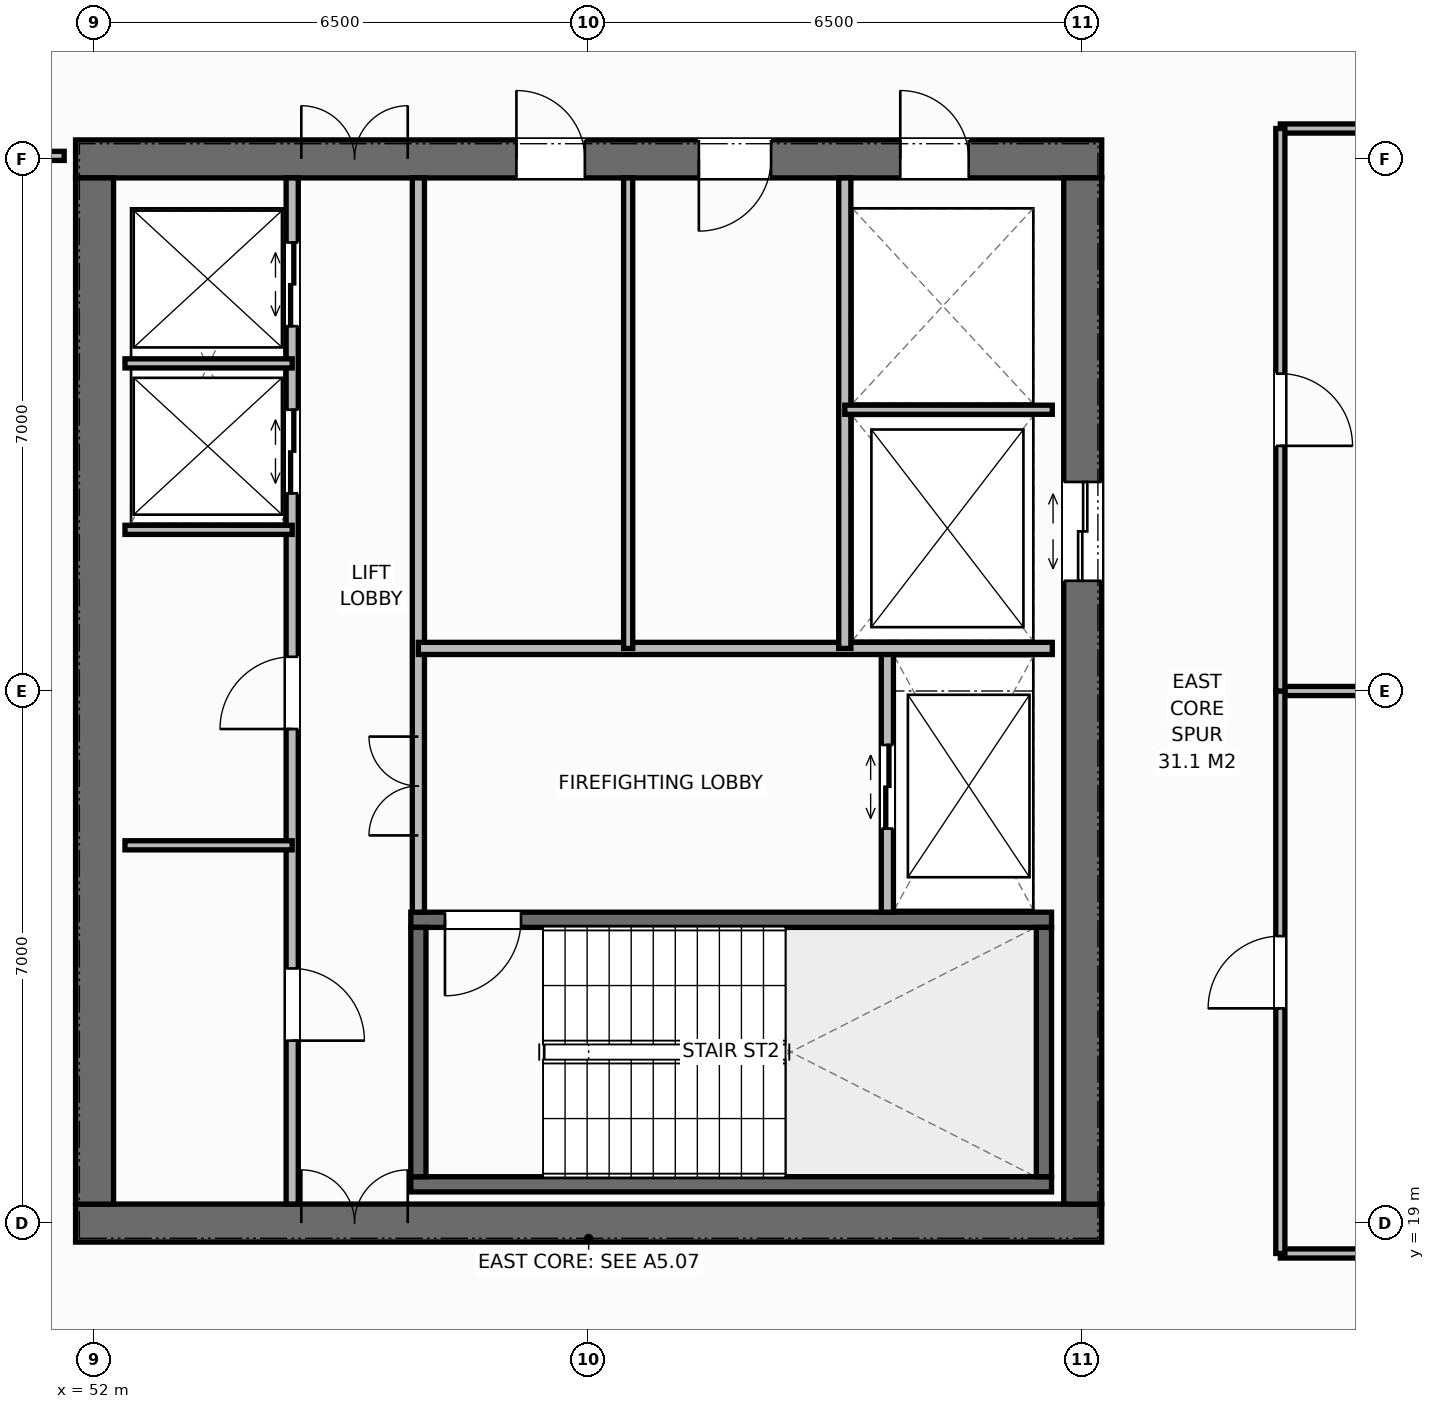
"""IFC4 building model, lengths in metres.
Left out: names, types, materials, properties, quantities, classifications, styles, units other than length and angle.
Written with IfcOpenShell. Run it as: python <this file> out.ifc"""

import sys

from ifc_helpers import new_model, si_unit, direction, frame, frame_2d, origin, place, context, subcontext, project, spatial, rectangle, extrude, element, fill, save


model = new_model("IFC4")
c1 = context("Model", 3, precision=1e-05, world=origin(), true_north=direction((0.0, 1.0)))
c2 = subcontext(c1, "Body", "Model", "MODEL_VIEW")
j1 = project(units=[si_unit("LENGTHUNIT", "METRE"), si_unit("PLANEANGLEUNIT", "RADIAN")], contexts=[c1])
p1 = place(None, origin())
s1 = spatial("IfcSite", under=j1, at=p1, CompositionType="ELEMENT")
p2 = place(p1, origin())
s2 = spatial("IfcBuilding", under=s1, at=p2, CompositionType="ELEMENT")
p3 = place(p2, frame((0.0, 0.0, 302.4)))
s3 = spatial("IfcBuildingStorey", under=s2, at=p3, CompositionType="ELEMENT", Elevation=302.4)
p4 = place(p3, frame((51.75, 19.0, 0.0), z_axis=(0.0, 0.0, 1.0), x_axis=(1.0, 0.0, 0.0)))
e1 = element("IfcWall", 1, at=p4, inside=s3, PredefinedType="SHEAR", context=c2, shape_type="SweptSolid", body=[
    extrude(rectangle(XDim=13.5, YDim=0.5, at=frame_2d((6.75, 0.0))), origin(), (0.0, 0.0, 1.0), 4.0),
])
p5 = place(p4, frame((2.97, 0.0, 0.0)))
e2 = element("IfcOpeningElement", 2, at=p5, cuts=e1, PredefinedType="OPENING", context=c2, shape_type="SweptSolid", body=[
    extrude(rectangle(XDim=1.4, YDim=2.2, at=frame_2d((0.7, 1.1))), frame((0.0, 0.26, 0.0), z_axis=(0.0, -1.0, 0.0), x_axis=(1.0, 0.0, 0.0)), (0.0, 0.0, 1.0), 0.52),
])
p6 = place(p3, frame((51.75, 33.0, 0.0), z_axis=(0.0, 0.0, 1.0), x_axis=(1.0, 0.0, 0.0)))
e3 = element("IfcWall", 3, at=p6, inside=s3, PredefinedType="SHEAR", context=c2, shape_type="SweptSolid", body=[
    extrude(rectangle(XDim=13.5, YDim=0.5, at=frame_2d((6.75, 0.0))), origin(), (0.0, 0.0, 1.0), 4.0),
])
p7 = place(p6, frame((2.97, 0.0, 0.0)))
e4 = element("IfcOpeningElement", 4, at=p7, cuts=e3, PredefinedType="OPENING", context=c2, shape_type="SweptSolid", body=[
    extrude(rectangle(XDim=1.4, YDim=2.2, at=frame_2d((0.7, 1.1))), frame((0.0, 0.26, 0.0), z_axis=(0.0, -1.0, 0.0), x_axis=(1.0, 0.0, 0.0)), (0.0, 0.0, 1.0), 0.52),
])
p8 = place(p6, frame((10.85, 0.0, 0.0)))
e5 = element("IfcOpeningElement", 5, at=p8, cuts=e3, PredefinedType="OPENING", context=c2, shape_type="SweptSolid", body=[
    extrude(rectangle(XDim=0.9, YDim=2.15, at=frame_2d((0.45, 1.075))), frame((0.0, 0.26, 0.0), z_axis=(0.0, -1.0, 0.0), x_axis=(1.0, 0.0, 0.0)), (0.0, 0.0, 1.0), 0.52),
])
p9 = place(p6, frame((5.8, 0.0, 0.0)))
e6 = element("IfcOpeningElement", 6, at=p9, cuts=e3, PredefinedType="OPENING", context=c2, shape_type="SweptSolid", body=[
    extrude(rectangle(XDim=0.9, YDim=2.15, at=frame_2d((0.45, 1.075))), frame((0.0, 0.26, 0.0), z_axis=(0.0, -1.0, 0.0), x_axis=(1.0, 0.0, 0.0)), (0.0, 0.0, 1.0), 0.52),
])
p10 = place(p6, frame((8.2, 0.0, 0.0)))
e7 = element("IfcOpeningElement", 7, at=p10, cuts=e3, PredefinedType="OPENING", context=c2, shape_type="SweptSolid", body=[
    extrude(rectangle(XDim=0.95, YDim=2.15, at=frame_2d((0.475, 1.075))), frame((0.0, 0.26, 0.0), z_axis=(0.0, -1.0, 0.0), x_axis=(1.0, 0.0, 0.0)), (0.0, 0.0, 1.0), 0.52),
])
p11 = place(p3, frame((52.0, 19.25, 0.0), z_axis=(0.0, 0.0, 1.0), x_axis=(0.0, 1.0, 0.0)))
e8 = element("IfcWall", 8, at=p11, inside=s3, PredefinedType="SHEAR", context=c2, shape_type="SweptSolid", body=[
    extrude(rectangle(XDim=13.5, YDim=0.5, at=frame_2d((6.75, 0.0))), origin(), (0.0, 0.0, 1.0), 4.0),
])
p12 = place(p3, frame((65.0, 19.25, 0.0), z_axis=(0.0, 0.0, 1.0), x_axis=(0.0, 1.0, 0.0)))
e9 = element("IfcWall", 9, at=p12, inside=s3, PredefinedType="SHEAR", context=c2, shape_type="SweptSolid", body=[
    extrude(rectangle(XDim=13.5, YDim=0.5, at=frame_2d((6.75, 0.0))), origin(), (0.0, 0.0, 1.0), 4.0),
])
p13 = place(p12, frame((8.2, 0.0, 0.0)))
e10 = element("IfcOpeningElement", 10, at=p13, cuts=e9, PredefinedType="OPENING", context=c2, shape_type="SweptSolid", body=[
    extrude(rectangle(XDim=1.3, YDim=2.2, at=frame_2d((0.65, 1.1))), frame((0.0, 0.26, 0.0), z_axis=(0.0, -1.0, 0.0), x_axis=(1.0, 0.0, 0.0)), (0.0, 0.0, 1.0), 0.52),
])
p14 = place(p3, frame((56.16, 19.51, 0.0), z_axis=(0.0, 0.0, 1.0), x_axis=(1.0, 0.0, 0.0)))
e11 = element("IfcWall", 11, at=p14, inside=s3, PredefinedType="SHEAR", context=c2, shape_type="SweptSolid", body=[
    extrude(rectangle(XDim=8.43, YDim=0.2, at=frame_2d((4.215, 0.0))), origin(), (0.0, 0.0, 1.0), 4.0),
])
p15 = place(p3, frame((56.16, 22.99, 0.0), z_axis=(0.0, 0.0, 1.0), x_axis=(1.0, 0.0, 0.0)))
e12 = element("IfcWall", 12, at=p15, inside=s3, PredefinedType="SHEAR", context=c2, shape_type="SweptSolid", body=[
    extrude(rectangle(XDim=8.43, YDim=0.2, at=frame_2d((4.215, 0.0))), origin(), (0.0, 0.0, 1.0), 4.0),
])
p16 = place(p15, frame((0.45, 0.0, 0.0)))
e13 = element("IfcOpeningElement", 13, at=p16, cuts=e12, PredefinedType="OPENING", context=c2, shape_type="SweptSolid", body=[
    extrude(rectangle(XDim=1.0, YDim=2.15, at=frame_2d((0.5, 1.075))), frame((0.0, 0.11, 0.0), z_axis=(0.0, -1.0, 0.0), x_axis=(1.0, 0.0, 0.0)), (0.0, 0.0, 1.0), 0.22),
])
for number, where, z_axis, x_axis in (
    (14, (56.26, 19.61, 0.0), (0.0, 0.0, 1.0), (0.0, 1.0, 0.0)),
    (15, (64.49, 19.61, 0.0), (0.0, 0.0, 1.0), (0.0, 1.0, 0.0)),
):
    element("IfcWall", number, at=place(p3, frame(where, z_axis=z_axis, x_axis=x_axis)), inside=s3, PredefinedType="SHEAR", context=c2, shape_type="SweptSolid", body=[
        extrude(rectangle(XDim=3.28, YDim=0.2, at=frame_2d((1.64, 0.0))), origin(), (0.0, 0.0, 1.0), 4.0),
    ])
p17 = place(p3, frame((54.6, 19.25, 0.0), z_axis=(0.0, 0.0, 1.0), x_axis=(0.0, 1.0, 0.0)))
e16 = element("IfcWall", 16, at=p17, inside=s3, PredefinedType="STANDARD", context=c2, shape_type="SweptSolid", body=[
    extrude(rectangle(XDim=13.5, YDim=0.16, at=frame_2d((6.75, 0.0))), origin(), (0.0, 0.0, 1.0), 3.788),
])
p18 = place(p17, frame((2.15, 0.0, 0.0)))
e17 = element("IfcOpeningElement", 17, at=p18, cuts=e16, PredefinedType="OPENING", context=c2, shape_type="SweptSolid", body=[
    extrude(rectangle(XDim=0.95, YDim=2.15, at=frame_2d((0.475, 1.075))), frame((0.0, 0.09, 0.0), z_axis=(0.0, -1.0, 0.0), x_axis=(1.0, 0.0, 0.0)), (0.0, 0.0, 1.0), 0.18),
])
p19 = place(p17, frame((6.25, 0.0, 0.0)))
e18 = element("IfcOpeningElement", 18, at=p19, cuts=e16, PredefinedType="OPENING", context=c2, shape_type="SweptSolid", body=[
    extrude(rectangle(XDim=0.95, YDim=2.15, at=frame_2d((0.475, 1.075))), frame((0.0, 0.09, 0.0), z_axis=(0.0, -1.0, 0.0), x_axis=(1.0, 0.0, 0.0)), (0.0, 0.0, 1.0), 0.18),
])
p20 = place(p17, frame((9.35, 0.0, 0.0)))
e19 = element("IfcOpeningElement", 19, at=p20, cuts=e16, PredefinedType="OPENING", context=c2, shape_type="SweptSolid", body=[
    extrude(rectangle(XDim=1.1, YDim=2.2, at=frame_2d((0.55, 1.1))), frame((0.0, 0.09, 0.0), z_axis=(0.0, -1.0, 0.0), x_axis=(1.0, 0.0, 0.0)), (0.0, 0.0, 1.0), 0.18),
])
p21 = place(p17, frame((11.55, 0.0, 0.0)))
e20 = element("IfcOpeningElement", 20, at=p21, cuts=e16, PredefinedType="OPENING", context=c2, shape_type="SweptSolid", body=[
    extrude(rectangle(XDim=1.1, YDim=2.2, at=frame_2d((0.55, 1.1))), frame((0.0, 0.09, 0.0), z_axis=(0.0, -1.0, 0.0), x_axis=(1.0, 0.0, 0.0)), (0.0, 0.0, 1.0), 0.18),
])
p22 = place(p3, frame((56.26, 23.09, 0.0), z_axis=(0.0, 0.0, 1.0), x_axis=(0.0, 1.0, 0.0)))
e21 = element("IfcWall", 21, at=p22, inside=s3, PredefinedType="STANDARD", context=c2, shape_type="SweptSolid", body=[
    extrude(rectangle(XDim=9.66, YDim=0.16, at=frame_2d((4.83, 0.0))), origin(), (0.0, 0.0, 1.0), 3.788),
])
p23 = place(p22, frame((1.01, 0.0, 0.0)))
e22 = element("IfcOpeningElement", 22, at=p23, cuts=e21, PredefinedType="OPENING", context=c2, shape_type="SweptSolid", body=[
    extrude(rectangle(XDim=1.3, YDim=2.2, at=frame_2d((0.65, 1.1))), frame((0.0, 0.09, 0.0), z_axis=(0.0, -1.0, 0.0), x_axis=(1.0, 0.0, 0.0)), (0.0, 0.0, 1.0), 0.18),
])
for number, where, z_axis, x_axis in (
    (23, (52.4, 23.97, 0.0), (0.0, 0.0, 1.0), (1.0, 0.0, 0.0)),
    (24, (52.4, 28.12, 0.0), (0.0, 0.0, 1.0), (1.0, 0.0, 0.0)),
    (25, (52.4, 30.31, 0.0), (0.0, 0.0, 1.0), (1.0, 0.0, 0.0)),
):
    element("IfcWall", number, at=place(p3, frame(where, z_axis=z_axis, x_axis=x_axis)), inside=s3, PredefinedType="PARTITIONING", context=c2, shape_type="SweptSolid", body=[
        extrude(rectangle(XDim=2.2, YDim=0.12, at=frame_2d((1.1, 0.0))), origin(), (0.0, 0.0, 1.0), 3.788),
    ])
p24 = place(p3, frame((62.43, 23.09, 0.0), z_axis=(0.0, 0.0, 1.0), x_axis=(0.0, 1.0, 0.0)))
e26 = element("IfcWall", 26, at=p24, inside=s3, PredefinedType="STANDARD", context=c2, shape_type="SweptSolid", body=[
    extrude(rectangle(XDim=3.47, YDim=0.16, at=frame_2d((1.735, 0.0))), origin(), (0.0, 0.0, 1.0), 3.788),
])
p25 = place(p24, frame((1.1, 0.0, 0.0)))
e27 = element("IfcOpeningElement", 27, at=p25, cuts=e26, PredefinedType="OPENING", context=c2, shape_type="SweptSolid", body=[
    extrude(rectangle(XDim=1.1, YDim=2.2, at=frame_2d((0.55, 1.1))), frame((0.0, 0.09, 0.0), z_axis=(0.0, -1.0, 0.0), x_axis=(1.0, 0.0, 0.0)), (0.0, 0.0, 1.0), 0.18),
])
p26 = place(p3, frame((56.26, 26.56, 0.0), z_axis=(0.0, 0.0, 1.0), x_axis=(1.0, 0.0, 0.0)))
e28 = element("IfcWall", 28, at=p26, inside=s3, PredefinedType="STANDARD", context=c2, shape_type="SweptSolid", body=[
    extrude(rectangle(XDim=8.34, YDim=0.16, at=frame_2d((4.17, 0.0))), origin(), (0.0, 0.0, 1.0), 3.788),
])
p27 = place(p3, frame((61.87, 26.56, 0.0), z_axis=(0.0, 0.0, 1.0), x_axis=(0.0, 1.0, 0.0)))
e29 = element("IfcWall", 29, at=p27, inside=s3, PredefinedType="STANDARD", context=c2, shape_type="SweptSolid", body=[
    extrude(rectangle(XDim=6.19, YDim=0.16, at=frame_2d((3.095, 0.0))), origin(), (0.0, 0.0, 1.0), 3.788),
])
p28 = place(p3, frame((61.87, 29.7, 0.0), z_axis=(0.0, 0.0, 1.0), x_axis=(1.0, 0.0, 0.0)))
e30 = element("IfcWall", 30, at=p28, inside=s3, PredefinedType="PARTITIONING", context=c2, shape_type="SweptSolid", body=[
    extrude(rectangle(XDim=2.73, YDim=0.12, at=frame_2d((1.365, 0.0))), origin(), (0.0, 0.0, 1.0), 3.788),
])
p29 = place(p3, frame((59.02, 26.56, 0.0), z_axis=(0.0, 0.0, 1.0), x_axis=(0.0, 1.0, 0.0)))
e31 = element("IfcWall", 31, at=p29, inside=s3, PredefinedType="PARTITIONING", context=c2, shape_type="SweptSolid", body=[
    extrude(rectangle(XDim=6.19, YDim=0.12, at=frame_2d((3.095, 0.0))), origin(), (0.0, 0.0, 1.0), 3.788),
])
p30 = place(p3, frame((48.0, 33.04, 0.0), z_axis=(0.0, 0.0, 1.0), x_axis=(1.0, 0.0, 0.0)))
e32 = element("IfcWall", 32, at=p30, inside=s3, PredefinedType="PARTITIONING", context=c2, shape_type="SweptSolid", body=[
    extrude(rectangle(XDim=3.6, YDim=0.12, at=frame_2d((1.8, 0.0))), origin(), (0.0, 0.0, 1.0), 3.528),
])
p31 = place(p30, frame((1.1, 0.0, 0.0)))
e33 = element("IfcOpeningElement", 33, at=p31, cuts=e32, PredefinedType="OPENING", context=c2, shape_type="SweptSolid", body=[
    extrude(rectangle(XDim=0.95, YDim=2.15, at=frame_2d((0.475, 1.075))), frame((0.0, 0.07, 0.0), z_axis=(0.0, -1.0, 0.0), x_axis=(1.0, 0.0, 0.0)), (0.0, 0.0, 1.0), 0.14),
])
for number, where, z_axis, x_axis in (
    (34, (67.6, 18.6, 0.0), (0.0, 0.0, 1.0), (1.0, 0.0, 0.0)),
    (35, (67.6, 33.4, 0.0), (0.0, 0.0, 1.0), (1.0, 0.0, 0.0)),
    (36, (67.6, 26.0, 0.0), (0.0, 0.0, 1.0), (1.0, 0.0, 0.0)),
):
    element("IfcWall", number, at=place(p3, frame(where, z_axis=z_axis, x_axis=x_axis)), inside=s3, PredefinedType="PARTITIONING", context=c2, shape_type="SweptSolid", body=[
        extrude(rectangle(XDim=6.432, YDim=0.12, at=frame_2d((3.216, 0.0))), origin(), (0.0, 0.0, 1.0), 3.788),
    ])
p32 = place(p3, frame((67.6, 18.6, 0.0), z_axis=(0.0, 0.0, 1.0), x_axis=(0.0, 1.0, 0.0)))
e37 = element("IfcWall", 37, at=p32, inside=s3, PredefinedType="PARTITIONING", context=c2, shape_type="SweptSolid", body=[
    extrude(rectangle(XDim=7.4, YDim=0.12, at=frame_2d((3.7, 0.0))), origin(), (0.0, 0.0, 1.0), 3.788),
])
p33 = place(p32, frame((3.225, 0.0, 0.0)))
e38 = element("IfcOpeningElement", 38, at=p33, cuts=e37, PredefinedType="OPENING", context=c2, shape_type="SweptSolid", body=[
    extrude(rectangle(XDim=0.95, YDim=2.15, at=frame_2d((0.475, 1.075))), frame((0.0, 0.07, 0.0), z_axis=(0.0, -1.0, 0.0), x_axis=(1.0, 0.0, 0.0)), (0.0, 0.0, 1.0), 0.14),
])
p34 = place(p3, frame((67.6, 26.0, 0.0), z_axis=(0.0, 0.0, 1.0), x_axis=(0.0, 1.0, 0.0)))
e39 = element("IfcWall", 39, at=p34, inside=s3, PredefinedType="PARTITIONING", context=c2, shape_type="SweptSolid", body=[
    extrude(rectangle(XDim=7.4, YDim=0.12, at=frame_2d((3.7, 0.0))), origin(), (0.0, 0.0, 1.0), 3.788),
])
p35 = place(p34, frame((3.225, 0.0, 0.0)))
e40 = element("IfcOpeningElement", 40, at=p35, cuts=e39, PredefinedType="OPENING", context=c2, shape_type="SweptSolid", body=[
    extrude(rectangle(XDim=0.95, YDim=2.15, at=frame_2d((0.475, 1.075))), frame((0.0, 0.07, 0.0), z_axis=(0.0, -1.0, 0.0), x_axis=(1.0, 0.0, 0.0)), (0.0, 0.0, 1.0), 0.14),
])
p36 = place(p5, origin())
e41 = element("IfcDoor", 41, at=p36, inside=s3, OperationType="DOUBLE_DOOR_SINGLE_SWING", PredefinedType="DOOR", context=c2, shape_type="SweptSolid", body=[
    extrude(rectangle(XDim=1.4, YDim=2.2, at=frame_2d((0.7, 1.1))), frame((0.0, 0.075, 0.0), z_axis=(0.0, -1.0, 0.0), x_axis=(1.0, 0.0, 0.0)), (0.0, 0.0, 1.0), 0.05),
])
fill(e2, e41)
p37 = place(p7, origin())
e42 = element("IfcDoor", 42, at=p37, inside=s3, OperationType="DOUBLE_DOOR_SINGLE_SWING", PredefinedType="DOOR", context=c2, shape_type="SweptSolid", body=[
    extrude(rectangle(XDim=1.4, YDim=2.2, at=frame_2d((0.7, 1.1))), frame((0.0, -0.025, 0.0), z_axis=(0.0, -1.0, 0.0), x_axis=(1.0, 0.0, 0.0)), (0.0, 0.0, 1.0), 0.05),
])
fill(e4, e42)
p38 = place(p18, origin())
e43 = element("IfcDoor", 43, at=p38, inside=s3, OperationType="SINGLE_SWING_RIGHT", PredefinedType="DOOR", context=c2, shape_type="SweptSolid", body=[
    extrude(rectangle(XDim=0.95, YDim=2.15, at=frame_2d((0.475, 1.075))), frame((0.0, 0.025, 0.0), z_axis=(0.0, -1.0, 0.0), x_axis=(1.0, 0.0, 0.0)), (0.0, 0.0, 1.0), 0.05),
])
fill(e17, e43)
p39 = place(p19, origin())
e44 = element("IfcDoor", 44, at=p39, inside=s3, OperationType="SINGLE_SWING_LEFT", PredefinedType="DOOR", context=c2, shape_type="SweptSolid", body=[
    extrude(rectangle(XDim=0.95, YDim=2.15, at=frame_2d((0.475, 1.075))), frame((0.0, 0.025, 0.0), z_axis=(0.0, -1.0, 0.0), x_axis=(1.0, 0.0, 0.0)), (0.0, 0.0, 1.0), 0.05),
])
fill(e18, e44)
p40 = place(p20, origin())
e45 = element("IfcDoor", 45, at=p40, inside=s3, OperationType="DOUBLE_DOOR_SLIDING", PredefinedType="DOOR", context=c2, shape_type="SweptSolid", body=[
    extrude(rectangle(XDim=1.1, YDim=2.2, at=frame_2d((0.55, 1.1))), frame((0.0, 0.025, 0.0), z_axis=(0.0, -1.0, 0.0), x_axis=(1.0, 0.0, 0.0)), (0.0, 0.0, 1.0), 0.05),
])
fill(e19, e45)
p41 = place(p21, origin())
e46 = element("IfcDoor", 46, at=p41, inside=s3, OperationType="DOUBLE_DOOR_SLIDING", PredefinedType="DOOR", context=c2, shape_type="SweptSolid", body=[
    extrude(rectangle(XDim=1.1, YDim=2.2, at=frame_2d((0.55, 1.1))), frame((0.0, 0.025, 0.0), z_axis=(0.0, -1.0, 0.0), x_axis=(1.0, 0.0, 0.0)), (0.0, 0.0, 1.0), 0.05),
])
fill(e20, e46)
p42 = place(p16, origin())
e47 = element("IfcDoor", 47, at=p42, inside=s3, OperationType="SINGLE_SWING_RIGHT", PredefinedType="DOOR", context=c2, shape_type="SweptSolid", body=[
    extrude(rectangle(XDim=1.0, YDim=2.15, at=frame_2d((0.5, 1.075))), frame((0.0, 0.025, 0.0), z_axis=(0.0, -1.0, 0.0), x_axis=(1.0, 0.0, 0.0)), (0.0, 0.0, 1.0), 0.05),
])
fill(e13, e47)
p43 = place(p25, origin())
e48 = element("IfcDoor", 48, at=p43, inside=s3, OperationType="DOUBLE_DOOR_SLIDING", PredefinedType="DOOR", context=c2, shape_type="SweptSolid", body=[
    extrude(rectangle(XDim=1.1, YDim=2.2, at=frame_2d((0.55, 1.1))), frame((0.0, 0.025, 0.0), z_axis=(0.0, -1.0, 0.0), x_axis=(1.0, 0.0, 0.0)), (0.0, 0.0, 1.0), 0.05),
])
fill(e27, e48)
p44 = place(p23, origin())
e49 = element("IfcDoor", 49, at=p44, inside=s3, OperationType="DOUBLE_DOOR_SINGLE_SWING", PredefinedType="DOOR", context=c2, shape_type="SweptSolid", body=[
    extrude(rectangle(XDim=1.3, YDim=2.2, at=frame_2d((0.65, 1.1))), frame((0.0, 0.025, 0.0), z_axis=(0.0, -1.0, 0.0), x_axis=(1.0, 0.0, 0.0)), (0.0, 0.0, 1.0), 0.05),
])
fill(e22, e49)
p45 = place(p13, origin())
e50 = element("IfcDoor", 50, at=p45, inside=s3, OperationType="DOUBLE_DOOR_SLIDING", PredefinedType="DOOR", context=c2, shape_type="SweptSolid", body=[
    extrude(rectangle(XDim=1.3, YDim=2.2, at=frame_2d((0.65, 1.1))), frame((0.0, 0.025, 0.0), z_axis=(0.0, -1.0, 0.0), x_axis=(1.0, 0.0, 0.0)), (0.0, 0.0, 1.0), 0.05),
])
fill(e10, e50)
p46 = place(p8, origin())
e51 = element("IfcDoor", 51, at=p46, inside=s3, OperationType="SINGLE_SWING_LEFT", PredefinedType="DOOR", context=c2, shape_type="SweptSolid", body=[
    extrude(rectangle(XDim=0.9, YDim=2.15, at=frame_2d((0.45, 1.075))), frame((0.0, -0.025, 0.0), z_axis=(0.0, -1.0, 0.0), x_axis=(1.0, 0.0, 0.0)), (0.0, 0.0, 1.0), 0.05),
])
fill(e5, e51)
p47 = place(p9, origin())
e52 = element("IfcDoor", 52, at=p47, inside=s3, OperationType="SINGLE_SWING_LEFT", PredefinedType="DOOR", context=c2, shape_type="SweptSolid", body=[
    extrude(rectangle(XDim=0.9, YDim=2.15, at=frame_2d((0.45, 1.075))), frame((0.0, -0.025, 0.0), z_axis=(0.0, -1.0, 0.0), x_axis=(1.0, 0.0, 0.0)), (0.0, 0.0, 1.0), 0.05),
])
fill(e6, e52)
p48 = place(p10, origin())
e53 = element("IfcDoor", 53, at=p48, inside=s3, OperationType="SINGLE_SWING_RIGHT", PredefinedType="DOOR", context=c2, shape_type="SweptSolid", body=[
    extrude(rectangle(XDim=0.95, YDim=2.15, at=frame_2d((0.475, 1.075))), frame((0.0, -0.025, 0.0), z_axis=(0.0, -1.0, 0.0), x_axis=(1.0, 0.0, 0.0)), (0.0, 0.0, 1.0), 0.05),
])
fill(e7, e53)
p49 = place(p33, origin())
e54 = element("IfcDoor", 54, at=p49, inside=s3, OperationType="SINGLE_SWING_LEFT", PredefinedType="DOOR", context=c2, shape_type="SweptSolid", body=[
    extrude(rectangle(XDim=0.95, YDim=2.15, at=frame_2d((0.475, 1.075))), frame((0.0, 0.025, 0.0), z_axis=(0.0, -1.0, 0.0), x_axis=(1.0, 0.0, 0.0)), (0.0, 0.0, 1.0), 0.05),
])
fill(e38, e54)
p50 = place(p35, origin())
e55 = element("IfcDoor", 55, at=p50, inside=s3, OperationType="SINGLE_SWING_RIGHT", PredefinedType="DOOR", context=c2, shape_type="SweptSolid", body=[
    extrude(rectangle(XDim=0.95, YDim=2.15, at=frame_2d((0.475, 1.075))), frame((0.0, 0.025, 0.0), z_axis=(0.0, -1.0, 0.0), x_axis=(1.0, 0.0, 0.0)), (0.0, 0.0, 1.0), 0.05),
])
fill(e40, e55)
save(model, sys.argv[1])
